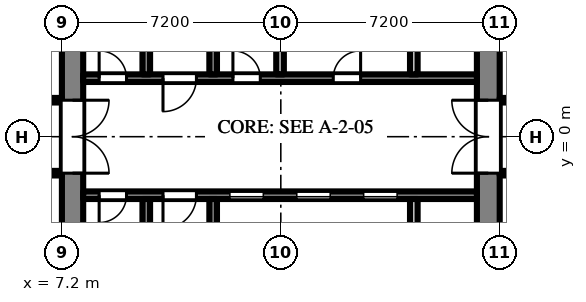
"""IFC4 building model, lengths in metres.
Left out: names, types, materials, properties, quantities, classifications, styles, units other than length and angle.
Written with IfcOpenShell. Run it as: python <this file> out.ifc"""

import sys

from ifc_helpers import new_model, si_unit, direction, frame, frame_2d, origin, place, context, subcontext, project, spatial, rectangle, extrude, element, fill, save


model = new_model("IFC4")
c1 = context("Model", 3, precision=1e-05, world=origin(), true_north=direction((0.0, 1.0)))
c2 = subcontext(c1, "Body", "Model", "MODEL_VIEW")
j1 = project(units=[si_unit("LENGTHUNIT", "METRE"), si_unit("PLANEANGLEUNIT", "RADIAN")], contexts=[c1])
p1 = place(None, origin())
s1 = spatial("IfcSite", under=j1, at=p1, CompositionType="ELEMENT")
p2 = place(p1, origin())
s2 = spatial("IfcBuilding", under=s1, at=p2, CompositionType="ELEMENT")
p3 = place(p2, frame((0.0, 0.0, 20.7)))
s3 = spatial("IfcBuildingStorey", under=s2, at=p3, CompositionType="ELEMENT", Elevation=20.7)
p4 = place(p3, frame((7.55, -7.2, 0.0), z_axis=(0.0, 0.0, 1.0), x_axis=(0.0, 1.0, 0.0)))
e1 = element("IfcWall", 1, at=p4, inside=s3, PredefinedType="SHEAR", context=c2, shape_type="SweptSolid", body=[
    extrude(rectangle(XDim=14.4, YDim=0.7, at=frame_2d((7.2, 0.0))), origin(), (0.0, 0.0, 1.0), 2.575),
])
p5 = place(p4, frame((6.0, 0.0, 0.0)))
e2 = element("IfcOpeningElement", 2, at=p5, cuts=e1, PredefinedType="OPENING", context=c2, shape_type="SweptSolid", body=[
    extrude(rectangle(XDim=2.4, YDim=2.2, at=frame_2d((1.2, 1.1))), frame((0.0, 0.36, 0.0), z_axis=(0.0, -1.0, 0.0), x_axis=(1.0, 0.0, 0.0)), (0.0, 0.0, 1.0), 0.72),
])
p6 = place(p3, frame((21.225, -7.2, 0.0), z_axis=(0.0, 0.0, 1.0), x_axis=(0.0, 1.0, 0.0)))
e3 = element("IfcWall", 3, at=p6, inside=s3, PredefinedType="SHEAR", context=c2, shape_type="SweptSolid", body=[
    extrude(rectangle(XDim=14.4, YDim=0.75, at=frame_2d((7.2, 0.0))), origin(), (0.0, 0.0, 1.0), 2.575),
])
p7 = place(p6, frame((6.0, 0.0, 0.0)))
e4 = element("IfcOpeningElement", 4, at=p7, cuts=e3, PredefinedType="OPENING", context=c2, shape_type="SweptSolid", body=[
    extrude(rectangle(XDim=2.4, YDim=2.2, at=frame_2d((1.2, 1.1))), frame((0.0, 0.385, 0.0), z_axis=(0.0, -1.0, 0.0), x_axis=(1.0, 0.0, 0.0)), (0.0, 0.0, 1.0), 0.77),
])
p8 = place(p3, frame((7.9, 1.925, 0.0), z_axis=(0.0, 0.0, 1.0), x_axis=(1.0, 0.0, 0.0)))
e5 = element("IfcWall", 5, at=p8, inside=s3, PredefinedType="SHEAR", context=c2, shape_type="SweptSolid", body=[
    extrude(rectangle(XDim=12.95, YDim=0.25, at=frame_2d((6.475, 0.0))), origin(), (0.0, 0.0, 1.0), 2.575),
])
p9 = place(p8, frame((0.525, 0.0, 0.0)))
e6 = element("IfcOpeningElement", 6, at=p9, cuts=e5, PredefinedType="OPENING", context=c2, shape_type="SweptSolid", body=[
    extrude(rectangle(XDim=0.9, YDim=2.1, at=frame_2d((0.45, 1.05))), frame((0.0, 0.135, 0.0), z_axis=(0.0, -1.0, 0.0), x_axis=(1.0, 0.0, 0.0)), (0.0, 0.0, 1.0), 0.27),
])
p10 = place(p8, frame((2.625, 0.0, 0.0)))
e7 = element("IfcOpeningElement", 7, at=p10, cuts=e5, PredefinedType="OPENING", context=c2, shape_type="SweptSolid", body=[
    extrude(rectangle(XDim=1.1, YDim=2.1, at=frame_2d((0.55, 1.05))), frame((0.0, 0.135, 0.0), z_axis=(0.0, -1.0, 0.0), x_axis=(1.0, 0.0, 0.0)), (0.0, 0.0, 1.0), 0.27),
])
p11 = place(p8, frame((4.925, 0.0, 0.0)))
e8 = element("IfcOpeningElement", 8, at=p11, cuts=e5, PredefinedType="OPENING", context=c2, shape_type="SweptSolid", body=[
    extrude(rectangle(XDim=0.9, YDim=2.1, at=frame_2d((0.45, 1.05))), frame((0.0, 0.135, 0.0), z_axis=(0.0, -1.0, 0.0), x_axis=(1.0, 0.0, 0.0)), (0.0, 0.0, 1.0), 0.27),
])
p12 = place(p8, frame((8.225, 0.0, 0.0)))
e9 = element("IfcOpeningElement", 9, at=p12, cuts=e5, PredefinedType="OPENING", context=c2, shape_type="SweptSolid", body=[
    extrude(rectangle(XDim=0.9, YDim=2.1, at=frame_2d((0.45, 1.05))), frame((0.0, 0.135, 0.0), z_axis=(0.0, -1.0, 0.0), x_axis=(1.0, 0.0, 0.0)), (0.0, 0.0, 1.0), 0.27),
])
p13 = place(p3, frame((9.975, 2.05, 0.0), z_axis=(0.0, 0.0, 1.0), x_axis=(0.0, 1.0, 0.0)))
e10 = element("IfcWall", 10, at=p13, inside=s3, PredefinedType="SHEAR", context=c2, shape_type="SweptSolid", body=[
    extrude(rectangle(XDim=4.65, YDim=0.25, at=frame_2d((2.325, 0.0))), origin(), (0.0, 0.0, 1.0), 2.575),
])
p14 = place(p13, frame((2.95, 0.0, 0.0)))
e11 = element("IfcOpeningElement", 11, at=p14, cuts=e10, PredefinedType="OPENING", context=c2, shape_type="SweptSolid", body=[
    extrude(rectangle(XDim=1.1, YDim=2.1, at=frame_2d((0.55, 1.05))), frame((0.0, 0.135, 0.0), z_axis=(0.0, -1.0, 0.0), x_axis=(1.0, 0.0, 0.0)), (0.0, 0.0, 1.0), 0.27),
])
p15 = place(p3, frame((12.175, 2.05, 0.0), z_axis=(0.0, 0.0, 1.0), x_axis=(0.0, 1.0, 0.0)))
e12 = element("IfcWall", 12, at=p15, inside=s3, PredefinedType="SHEAR", context=c2, shape_type="SweptSolid", body=[
    extrude(rectangle(XDim=4.65, YDim=0.25, at=frame_2d((2.325, 0.0))), origin(), (0.0, 0.0, 1.0), 2.575),
])
p16 = place(p15, frame((2.95, 0.0, 0.0)))
e13 = element("IfcOpeningElement", 13, at=p16, cuts=e12, PredefinedType="OPENING", context=c2, shape_type="SweptSolid", body=[
    extrude(rectangle(XDim=1.1, YDim=2.1, at=frame_2d((0.55, 1.05))), frame((0.0, 0.135, 0.0), z_axis=(0.0, -1.0, 0.0), x_axis=(1.0, 0.0, 0.0)), (0.0, 0.0, 1.0), 0.27),
])
for number, where, z_axis, x_axis in (
    (14, (14.375, 2.05, 0.0), (0.0, 0.0, 1.0), (0.0, 1.0, 0.0)),
    (15, (18.775, 2.05, 0.0), (0.0, 0.0, 1.0), (0.0, 1.0, 0.0)),
):
    element("IfcWall", number, at=place(p3, frame(where, z_axis=z_axis, x_axis=x_axis)), inside=s3, PredefinedType="PARTITIONING", context=c2, shape_type="SweptSolid", body=[
        extrude(rectangle(XDim=2.1, YDim=0.25, at=frame_2d((1.05, 0.0))), origin(), (0.0, 0.0, 1.0), 2.575),
    ])
p17 = place(p3, frame((7.9, -1.925, 0.0), z_axis=(0.0, 0.0, 1.0), x_axis=(1.0, 0.0, 0.0)))
e16 = element("IfcWall", 16, at=p17, inside=s3, PredefinedType="SHEAR", context=c2, shape_type="SweptSolid", body=[
    extrude(rectangle(XDim=12.95, YDim=0.25, at=frame_2d((6.475, 0.0))), origin(), (0.0, 0.0, 1.0), 2.575),
])
p18 = place(p17, frame((4.825, 0.0, 0.0)))
e17 = element("IfcOpeningElement", 17, at=p18, cuts=e16, PredefinedType="OPENING", context=c2, shape_type="SweptSolid", body=[
    extrude(rectangle(XDim=1.1, YDim=2.1, at=frame_2d((0.55, 1.05))), frame((0.0, 0.135, 0.0), z_axis=(0.0, -1.0, 0.0), x_axis=(1.0, 0.0, 0.0)), (0.0, 0.0, 1.0), 0.27),
])
p19 = place(p17, frame((7.025, 0.0, 0.0)))
e18 = element("IfcOpeningElement", 18, at=p19, cuts=e16, PredefinedType="OPENING", context=c2, shape_type="SweptSolid", body=[
    extrude(rectangle(XDim=1.1, YDim=2.1, at=frame_2d((0.55, 1.05))), frame((0.0, 0.135, 0.0), z_axis=(0.0, -1.0, 0.0), x_axis=(1.0, 0.0, 0.0)), (0.0, 0.0, 1.0), 0.27),
])
p20 = place(p17, frame((9.225, 0.0, 0.0)))
e19 = element("IfcOpeningElement", 19, at=p20, cuts=e16, PredefinedType="OPENING", context=c2, shape_type="SweptSolid", body=[
    extrude(rectangle(XDim=1.1, YDim=2.1, at=frame_2d((0.55, 1.05))), frame((0.0, 0.135, 0.0), z_axis=(0.0, -1.0, 0.0), x_axis=(1.0, 0.0, 0.0)), (0.0, 0.0, 1.0), 0.27),
])
p21 = place(p17, frame((0.525, 0.0, 0.0)))
e20 = element("IfcOpeningElement", 20, at=p21, cuts=e16, PredefinedType="OPENING", context=c2, shape_type="SweptSolid", body=[
    extrude(rectangle(XDim=0.9, YDim=2.1, at=frame_2d((0.45, 1.05))), frame((0.0, 0.135, 0.0), z_axis=(0.0, -1.0, 0.0), x_axis=(1.0, 0.0, 0.0)), (0.0, 0.0, 1.0), 0.27),
])
p22 = place(p17, frame((2.625, 0.0, 0.0)))
e21 = element("IfcOpeningElement", 21, at=p22, cuts=e16, PredefinedType="OPENING", context=c2, shape_type="SweptSolid", body=[
    extrude(rectangle(XDim=1.1, YDim=2.1, at=frame_2d((0.55, 1.05))), frame((0.0, 0.135, 0.0), z_axis=(0.0, -1.0, 0.0), x_axis=(1.0, 0.0, 0.0)), (0.0, 0.0, 1.0), 0.27),
])
p23 = place(p3, frame((9.975, -2.05, 0.0), z_axis=(0.0, 0.0, 1.0), x_axis=(0.0, -1.0, 0.0)))
e22 = element("IfcWall", 22, at=p23, inside=s3, PredefinedType="SHEAR", context=c2, shape_type="SweptSolid", body=[
    extrude(rectangle(XDim=4.65, YDim=0.25, at=frame_2d((2.325, 0.0))), origin(), (0.0, 0.0, 1.0), 2.575),
])
p24 = place(p23, frame((2.95, 0.0, 0.0)))
e23 = element("IfcOpeningElement", 23, at=p24, cuts=e22, PredefinedType="OPENING", context=c2, shape_type="SweptSolid", body=[
    extrude(rectangle(XDim=1.1, YDim=2.1, at=frame_2d((0.55, 1.05))), frame((0.0, 0.135, 0.0), z_axis=(0.0, -1.0, 0.0), x_axis=(1.0, 0.0, 0.0)), (0.0, 0.0, 1.0), 0.27),
])
p25 = place(p3, frame((12.175, -2.05, 0.0), z_axis=(0.0, 0.0, 1.0), x_axis=(0.0, -1.0, 0.0)))
e24 = element("IfcWall", 24, at=p25, inside=s3, PredefinedType="SHEAR", context=c2, shape_type="SweptSolid", body=[
    extrude(rectangle(XDim=4.65, YDim=0.25, at=frame_2d((2.325, 0.0))), origin(), (0.0, 0.0, 1.0), 2.575),
])
p26 = place(p25, frame((2.95, 0.0, 0.0)))
e25 = element("IfcOpeningElement", 25, at=p26, cuts=e24, PredefinedType="OPENING", context=c2, shape_type="SweptSolid", body=[
    extrude(rectangle(XDim=1.1, YDim=2.1, at=frame_2d((0.55, 1.05))), frame((0.0, 0.135, 0.0), z_axis=(0.0, -1.0, 0.0), x_axis=(1.0, 0.0, 0.0)), (0.0, 0.0, 1.0), 0.27),
])
p27 = place(p3, frame((18.775, -2.05, 0.0), z_axis=(0.0, 0.0, 1.0), x_axis=(0.0, -1.0, 0.0)))
e26 = element("IfcWall", 26, at=p27, inside=s3, PredefinedType="PARTITIONING", context=c2, shape_type="SweptSolid", body=[
    extrude(rectangle(XDim=2.1, YDim=0.25, at=frame_2d((1.05, 0.0))), origin(), (0.0, 0.0, 1.0), 2.575),
])
p28 = place(p3, frame((1.275, -1.2, 0.0), z_axis=(0.0, 0.0, 1.0), x_axis=(1.0, 0.0, 0.0)))
e27 = element("IfcWall", 27, at=p28, inside=s3, PredefinedType="PARTITIONING", context=c2, shape_type="SweptSolid", body=[
    extrude(rectangle(XDim=5.925, YDim=0.15, at=frame_2d((2.962, 0.0))), origin(), (0.0, 0.0, 1.0), 2.575),
])
p29 = place(p28, frame((4.475, 0.0, 0.0)))
e28 = element("IfcOpeningElement", 28, at=p29, cuts=e27, PredefinedType="OPENING", context=c2, shape_type="SweptSolid", body=[
    extrude(rectangle(XDim=0.9, YDim=2.1, at=frame_2d((0.45, 1.05))), frame((0.0, 0.085, 0.0), z_axis=(0.0, -1.0, 0.0), x_axis=(1.0, 0.0, 0.0)), (0.0, 0.0, 1.0), 0.17),
])
p30 = place(p3, frame((1.275, 1.2, 0.0), z_axis=(0.0, 0.0, 1.0), x_axis=(1.0, 0.0, 0.0)))
e29 = element("IfcWall", 29, at=p30, inside=s3, PredefinedType="PARTITIONING", context=c2, shape_type="SweptSolid", body=[
    extrude(rectangle(XDim=5.925, YDim=0.15, at=frame_2d((2.962, 0.0))), origin(), (0.0, 0.0, 1.0), 2.575),
])
p31 = place(p30, frame((3.475, 0.0, 0.0)))
e30 = element("IfcOpeningElement", 30, at=p31, cuts=e29, PredefinedType="OPENING", context=c2, shape_type="SweptSolid", body=[
    extrude(rectangle(XDim=0.9, YDim=2.1, at=frame_2d((0.45, 1.05))), frame((0.0, 0.085, 0.0), z_axis=(0.0, -1.0, 0.0), x_axis=(1.0, 0.0, 0.0)), (0.0, 0.0, 1.0), 0.17),
])
p32 = place(p3, frame((21.6, -1.2, 0.0), z_axis=(0.0, 0.0, 1.0), x_axis=(1.0, 0.0, 0.0)))
e31 = element("IfcWall", 31, at=p32, inside=s3, PredefinedType="PARTITIONING", context=c2, shape_type="SweptSolid", body=[
    extrude(rectangle(XDim=14.9, YDim=0.15, at=frame_2d((7.45, 0.0))), origin(), (0.0, 0.0, 1.0), 2.575),
])
p33 = place(p32, frame((0.45, 0.0, 0.0)))
e32 = element("IfcOpeningElement", 32, at=p33, cuts=e31, PredefinedType="OPENING", context=c2, shape_type="SweptSolid", body=[
    extrude(rectangle(XDim=0.9, YDim=2.1, at=frame_2d((0.45, 1.05))), frame((0.0, 0.085, 0.0), z_axis=(0.0, -1.0, 0.0), x_axis=(1.0, 0.0, 0.0)), (0.0, 0.0, 1.0), 0.17),
])
p34 = place(p32, frame((2.25, 0.0, 0.0)))
e33 = element("IfcOpeningElement", 33, at=p34, cuts=e31, PredefinedType="OPENING", context=c2, shape_type="SweptSolid", body=[
    extrude(rectangle(XDim=0.9, YDim=2.1, at=frame_2d((0.45, 1.05))), frame((0.0, 0.085, 0.0), z_axis=(0.0, -1.0, 0.0), x_axis=(1.0, 0.0, 0.0)), (0.0, 0.0, 1.0), 0.17),
])
p35 = place(p32, frame((4.05, 0.0, 0.0)))
e34 = element("IfcOpeningElement", 34, at=p35, cuts=e31, PredefinedType="OPENING", context=c2, shape_type="SweptSolid", body=[
    extrude(rectangle(XDim=0.9, YDim=2.1, at=frame_2d((0.45, 1.05))), frame((0.0, 0.085, 0.0), z_axis=(0.0, -1.0, 0.0), x_axis=(1.0, 0.0, 0.0)), (0.0, 0.0, 1.0), 0.17),
])
p36 = place(p32, frame((5.85, 0.0, 0.0)))
e35 = element("IfcOpeningElement", 35, at=p36, cuts=e31, PredefinedType="OPENING", context=c2, shape_type="SweptSolid", body=[
    extrude(rectangle(XDim=0.9, YDim=2.1, at=frame_2d((0.45, 1.05))), frame((0.0, 0.085, 0.0), z_axis=(0.0, -1.0, 0.0), x_axis=(1.0, 0.0, 0.0)), (0.0, 0.0, 1.0), 0.17),
])
p37 = place(p32, frame((7.65, 0.0, 0.0)))
e36 = element("IfcOpeningElement", 36, at=p37, cuts=e31, PredefinedType="OPENING", context=c2, shape_type="SweptSolid", body=[
    extrude(rectangle(XDim=0.9, YDim=2.1, at=frame_2d((0.45, 1.05))), frame((0.0, 0.085, 0.0), z_axis=(0.0, -1.0, 0.0), x_axis=(1.0, 0.0, 0.0)), (0.0, 0.0, 1.0), 0.17),
])
p38 = place(p32, frame((9.45, 0.0, 0.0)))
e37 = element("IfcOpeningElement", 37, at=p38, cuts=e31, PredefinedType="OPENING", context=c2, shape_type="SweptSolid", body=[
    extrude(rectangle(XDim=0.9, YDim=2.1, at=frame_2d((0.45, 1.05))), frame((0.0, 0.085, 0.0), z_axis=(0.0, -1.0, 0.0), x_axis=(1.0, 0.0, 0.0)), (0.0, 0.0, 1.0), 0.17),
])
p39 = place(p32, frame((11.95, 0.0, 0.0)))
e38 = element("IfcOpeningElement", 38, at=p39, cuts=e31, PredefinedType="OPENING", context=c2, shape_type="SweptSolid", body=[
    extrude(rectangle(XDim=1.8, YDim=2.1, at=frame_2d((0.9, 1.05))), frame((0.0, 0.085, 0.0), z_axis=(0.0, -1.0, 0.0), x_axis=(1.0, 0.0, 0.0)), (0.0, 0.0, 1.0), 0.17),
])
p40 = place(p3, frame((21.6, 1.2, 0.0), z_axis=(0.0, 0.0, 1.0), x_axis=(1.0, 0.0, 0.0)))
e39 = element("IfcWall", 39, at=p40, inside=s3, PredefinedType="PARTITIONING", context=c2, shape_type="SweptSolid", body=[
    extrude(rectangle(XDim=14.9, YDim=0.15, at=frame_2d((7.45, 0.0))), origin(), (0.0, 0.0, 1.0), 2.575),
])
p41 = place(p40, frame((1.35, 0.0, 0.0)))
e40 = element("IfcOpeningElement", 40, at=p41, cuts=e39, PredefinedType="OPENING", context=c2, shape_type="SweptSolid", body=[
    extrude(rectangle(XDim=0.9, YDim=2.1, at=frame_2d((0.45, 1.05))), frame((0.0, 0.085, 0.0), z_axis=(0.0, -1.0, 0.0), x_axis=(1.0, 0.0, 0.0)), (0.0, 0.0, 1.0), 0.17),
])
p42 = place(p40, frame((6.3, 0.0, 0.0)))
e41 = element("IfcOpeningElement", 41, at=p42, cuts=e39, PredefinedType="OPENING", context=c2, shape_type="SweptSolid", body=[
    extrude(rectangle(XDim=1.8, YDim=2.1, at=frame_2d((0.9, 1.05))), frame((0.0, 0.085, 0.0), z_axis=(0.0, -1.0, 0.0), x_axis=(1.0, 0.0, 0.0)), (0.0, 0.0, 1.0), 0.17),
])
p43 = place(p40, frame((11.95, 0.0, 0.0)))
e42 = element("IfcOpeningElement", 42, at=p43, cuts=e39, PredefinedType="OPENING", context=c2, shape_type="SweptSolid", body=[
    extrude(rectangle(XDim=1.8, YDim=2.1, at=frame_2d((0.9, 1.05))), frame((0.0, 0.085, 0.0), z_axis=(0.0, -1.0, 0.0), x_axis=(1.0, 0.0, 0.0)), (0.0, 0.0, 1.0), 0.17),
])
p44 = place(p18, origin())
e43 = element("IfcDoor", 43, at=p44, inside=s3, OperationType="SLIDING_TO_LEFT", PredefinedType="DOOR", context=c2, shape_type="SweptSolid", body=[
    extrude(rectangle(XDim=1.1, YDim=2.1, at=frame_2d((0.55, 1.05))), frame((0.0, 0.025, 0.0), z_axis=(0.0, -1.0, 0.0), x_axis=(1.0, 0.0, 0.0)), (0.0, 0.0, 1.0), 0.05),
])
fill(e17, e43)
p45 = place(p19, origin())
e44 = element("IfcDoor", 44, at=p45, inside=s3, OperationType="SLIDING_TO_LEFT", PredefinedType="DOOR", context=c2, shape_type="SweptSolid", body=[
    extrude(rectangle(XDim=1.1, YDim=2.1, at=frame_2d((0.55, 1.05))), frame((0.0, 0.025, 0.0), z_axis=(0.0, -1.0, 0.0), x_axis=(1.0, 0.0, 0.0)), (0.0, 0.0, 1.0), 0.05),
])
fill(e18, e44)
p46 = place(p20, origin())
e45 = element("IfcDoor", 45, at=p46, inside=s3, OperationType="SLIDING_TO_LEFT", PredefinedType="DOOR", context=c2, shape_type="SweptSolid", body=[
    extrude(rectangle(XDim=1.1, YDim=2.1, at=frame_2d((0.55, 1.05))), frame((0.0, 0.025, 0.0), z_axis=(0.0, -1.0, 0.0), x_axis=(1.0, 0.0, 0.0)), (0.0, 0.0, 1.0), 0.05),
])
fill(e19, e45)
p47 = place(p9, origin())
e46 = element("IfcDoor", 46, at=p47, inside=s3, OperationType="SINGLE_SWING_LEFT", PredefinedType="DOOR", context=c2, shape_type="SweptSolid", body=[
    extrude(rectangle(XDim=0.9, YDim=2.1, at=frame_2d((0.45, 1.05))), frame((0.0, 0.025, 0.0), z_axis=(0.0, -1.0, 0.0), x_axis=(1.0, 0.0, 0.0)), (0.0, 0.0, 1.0), 0.05),
])
fill(e6, e46)
p48 = place(p21, frame((0.9, 0.0, 0.0), z_axis=(0.0, 0.0, 1.0), x_axis=(-1.0, 0.0, 0.0)))
e47 = element("IfcDoor", 47, at=p48, inside=s3, OperationType="SINGLE_SWING_RIGHT", PredefinedType="DOOR", context=c2, shape_type="SweptSolid", body=[
    extrude(rectangle(XDim=0.9, YDim=2.1, at=frame_2d((0.45, 1.05))), frame((0.0, 0.025, 0.0), z_axis=(0.0, -1.0, 0.0), x_axis=(1.0, 0.0, 0.0)), (0.0, 0.0, 1.0), 0.05),
])
fill(e20, e47)
p49 = place(p10, frame((1.1, 0.0, 0.0), z_axis=(0.0, 0.0, 1.0), x_axis=(-1.0, 0.0, 0.0)))
e48 = element("IfcDoor", 48, at=p49, inside=s3, OperationType="SINGLE_SWING_RIGHT", PredefinedType="DOOR", context=c2, shape_type="SweptSolid", body=[
    extrude(rectangle(XDim=1.1, YDim=2.1, at=frame_2d((0.55, 1.05))), frame((0.0, 0.025, 0.0), z_axis=(0.0, -1.0, 0.0), x_axis=(1.0, 0.0, 0.0)), (0.0, 0.0, 1.0), 0.05),
])
fill(e7, e48)
p50 = place(p22, frame((1.1, 0.0, 0.0), z_axis=(0.0, 0.0, 1.0), x_axis=(-1.0, 0.0, 0.0)))
e49 = element("IfcDoor", 49, at=p50, inside=s3, OperationType="SINGLE_SWING_RIGHT", PredefinedType="DOOR", context=c2, shape_type="SweptSolid", body=[
    extrude(rectangle(XDim=1.1, YDim=2.1, at=frame_2d((0.55, 1.05))), frame((0.0, 0.025, 0.0), z_axis=(0.0, -1.0, 0.0), x_axis=(1.0, 0.0, 0.0)), (0.0, 0.0, 1.0), 0.05),
])
fill(e21, e49)
p51 = place(p5, frame((2.4, 0.0, 0.0), z_axis=(0.0, 0.0, 1.0), x_axis=(-1.0, 0.0, 0.0)))
e50 = element("IfcDoor", 50, at=p51, inside=s3, OperationType="DOUBLE_DOOR_DOUBLE_SWING", PredefinedType="DOOR", context=c2, shape_type="SweptSolid", body=[
    extrude(rectangle(XDim=2.4, YDim=2.2, at=frame_2d((1.2, 1.1))), frame((0.0, 0.025, 0.0), z_axis=(0.0, -1.0, 0.0), x_axis=(1.0, 0.0, 0.0)), (0.0, 0.0, 1.0), 0.05),
])
fill(e2, e50)
p52 = place(p7, origin())
e51 = element("IfcDoor", 51, at=p52, inside=s3, OperationType="DOUBLE_DOOR_DOUBLE_SWING", PredefinedType="DOOR", context=c2, shape_type="SweptSolid", body=[
    extrude(rectangle(XDim=2.4, YDim=2.2, at=frame_2d((1.2, 1.1))), frame((0.0, 0.025, 0.0), z_axis=(0.0, -1.0, 0.0), x_axis=(1.0, 0.0, 0.0)), (0.0, 0.0, 1.0), 0.05),
])
fill(e4, e51)
p53 = place(p11, origin())
e52 = element("IfcDoor", 52, at=p53, inside=s3, OperationType="SINGLE_SWING_LEFT", PredefinedType="DOOR", context=c2, shape_type="SweptSolid", body=[
    extrude(rectangle(XDim=0.9, YDim=2.1, at=frame_2d((0.45, 1.05))), frame((0.0, 0.025, 0.0), z_axis=(0.0, -1.0, 0.0), x_axis=(1.0, 0.0, 0.0)), (0.0, 0.0, 1.0), 0.05),
])
fill(e8, e52)
p54 = place(p12, origin())
e53 = element("IfcDoor", 53, at=p54, inside=s3, OperationType="SINGLE_SWING_RIGHT", PredefinedType="DOOR", context=c2, shape_type="SweptSolid", body=[
    extrude(rectangle(XDim=0.9, YDim=2.1, at=frame_2d((0.45, 1.05))), frame((0.0, 0.025, 0.0), z_axis=(0.0, -1.0, 0.0), x_axis=(1.0, 0.0, 0.0)), (0.0, 0.0, 1.0), 0.05),
])
fill(e9, e53)
save(model, sys.argv[1])
